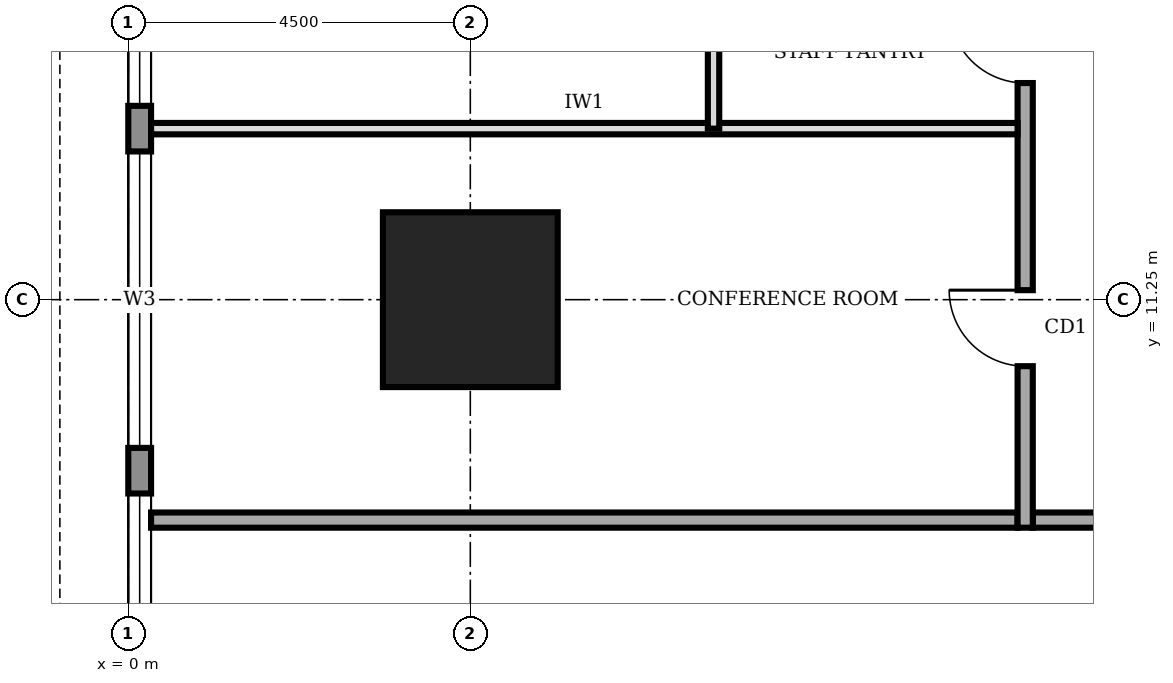
"""IFC4 building model, lengths in metres.
Left out: names, types, materials, properties, quantities, classifications, styles, units other than length and angle.
Written with IfcOpenShell. Run it as: python <this file> out.ifc"""

import sys

from ifc_helpers import new_model, si_unit, direction, frame, frame_2d, origin, origin_2d, place, context, subcontext, project, spatial, rectangle, extrude, element, fill, save


model = new_model("IFC4")
c1 = context("Model", 3, precision=1e-05, world=origin(), true_north=direction((0.0, 1.0)))
c2 = subcontext(c1, "Body", "Model", "MODEL_VIEW")
j1 = project(units=[si_unit("LENGTHUNIT", "METRE"), si_unit("PLANEANGLEUNIT", "RADIAN")], contexts=[c1])
p1 = place(None, origin())
s1 = spatial("IfcSite", under=j1, at=p1, CompositionType="ELEMENT")
p2 = place(p1, origin())
s2 = spatial("IfcBuilding", under=s1, at=p2, CompositionType="ELEMENT")
p3 = place(p2, frame((0.0, 0.0, 97.0)))
s3 = spatial("IfcBuildingStorey", under=s2, at=p3, CompositionType="ELEMENT", Elevation=97.0)
p4 = place(p3, frame((4.5, 11.25, 0.0), z_axis=(0.0, 0.0, 1.0), x_axis=(1.0, 0.0, 0.0)))
e1 = element("IfcColumn", 1, at=p4, inside=s3, PredefinedType="COLUMN", context=c2, shape_type="SweptSolid", body=[
    extrude(rectangle(XDim=2.3, YDim=2.3, at=origin_2d()), origin(), (0.0, 0.0, 1.0), 4.0),
])
p5 = place(p3, frame((0.15, 35.98, 0.0), z_axis=(0.0, 0.0, 1.0), x_axis=(0.0, -1.0, 0.0)))
e2 = element("IfcWall", 2, at=p5, inside=s3, PredefinedType="STANDARD", context=c2, shape_type="SweptSolid", body=[
    extrude(rectangle(XDim=31.46, YDim=0.3, at=frame_2d((15.73, 0.0))), origin(), (0.0, 0.0, 1.0), 3.75),
])
p6 = place(p5, frame((27.28, 0.0, 0.95)))
e3 = element("IfcOpeningElement", 3, at=p6, cuts=e2, PredefinedType="OPENING", context=c2, shape_type="SweptSolid", body=[
    extrude(rectangle(XDim=3.9, YDim=1.8, at=frame_2d((1.95, 0.9))), frame((0.0, 0.16, 0.0), z_axis=(0.0, -1.0, 0.0), x_axis=(1.0, 0.0, 0.0)), (0.0, 0.0, 1.0), 0.32),
])
p7 = place(p5, frame((22.78, 0.0, 0.95)))
e4 = element("IfcOpeningElement", 4, at=p7, cuts=e2, PredefinedType="OPENING", context=c2, shape_type="SweptSolid", body=[
    extrude(rectangle(XDim=3.9, YDim=1.8, at=frame_2d((1.95, 0.9))), frame((0.0, 0.16, 0.0), z_axis=(0.0, -1.0, 0.0), x_axis=(1.0, 0.0, 0.0)), (0.0, 0.0, 1.0), 0.32),
])
p8 = place(p5, frame((18.28, 0.0, 0.95)))
e5 = element("IfcOpeningElement", 5, at=p8, cuts=e2, PredefinedType="OPENING", context=c2, shape_type="SweptSolid", body=[
    extrude(rectangle(XDim=3.9, YDim=1.8, at=frame_2d((1.95, 0.9))), frame((0.0, 0.16, 0.0), z_axis=(0.0, -1.0, 0.0), x_axis=(1.0, 0.0, 0.0)), (0.0, 0.0, 1.0), 0.32),
])
p9 = place(p5, frame((13.78, 0.0, 0.95)))
e6 = element("IfcOpeningElement", 6, at=p9, cuts=e2, PredefinedType="OPENING", context=c2, shape_type="SweptSolid", body=[
    extrude(rectangle(XDim=3.9, YDim=1.8, at=frame_2d((1.95, 0.9))), frame((0.0, 0.16, 0.0), z_axis=(0.0, -1.0, 0.0), x_axis=(1.0, 0.0, 0.0)), (0.0, 0.0, 1.0), 0.32),
])
p10 = place(p5, frame((9.28, 0.0, 0.95)))
e7 = element("IfcOpeningElement", 7, at=p10, cuts=e2, PredefinedType="OPENING", context=c2, shape_type="SweptSolid", body=[
    extrude(rectangle(XDim=3.9, YDim=1.8, at=frame_2d((1.95, 0.9))), frame((0.0, 0.16, 0.0), z_axis=(0.0, -1.0, 0.0), x_axis=(1.0, 0.0, 0.0)), (0.0, 0.0, 1.0), 0.32),
])
p11 = place(p5, frame((4.78, 0.0, 0.95)))
e8 = element("IfcOpeningElement", 8, at=p11, cuts=e2, PredefinedType="OPENING", context=c2, shape_type="SweptSolid", body=[
    extrude(rectangle(XDim=3.9, YDim=1.8, at=frame_2d((1.95, 0.9))), frame((0.0, 0.16, 0.0), z_axis=(0.0, -1.0, 0.0), x_axis=(1.0, 0.0, 0.0)), (0.0, 0.0, 1.0), 0.32),
])
p12 = place(p3, frame((11.9, 8.35, 0.0), z_axis=(0.0, 0.0, 1.0), x_axis=(1.0, 0.0, 0.0)))
e9 = element("IfcWall", 9, at=p12, inside=s3, PredefinedType="SOLIDWALL", context=c2, shape_type="SweptSolid", body=[
    extrude(rectangle(XDim=28.3, YDim=0.2, at=frame_2d((14.15, 0.0))), origin(), (0.0, 0.0, 1.0), 3.75),
])
p13 = place(p12, frame((2.25, 0.0, 0.0)))
e10 = element("IfcOpeningElement", 10, at=p13, cuts=e9, PredefinedType="OPENING", context=c2, shape_type="SweptSolid", body=[
    extrude(rectangle(XDim=1.4, YDim=2.1, at=frame_2d((0.7, 1.05))), frame((0.0, 0.11, 0.0), z_axis=(0.0, -1.0, 0.0), x_axis=(1.0, 0.0, 0.0)), (0.0, 0.0, 1.0), 0.22),
])
p14 = place(p12, frame((7.85, 0.0, 0.0)))
e11 = element("IfcOpeningElement", 11, at=p14, cuts=e9, PredefinedType="OPENING", context=c2, shape_type="SweptSolid", body=[
    extrude(rectangle(XDim=1.0, YDim=2.1, at=frame_2d((0.5, 1.05))), frame((0.0, 0.11, 0.0), z_axis=(0.0, -1.0, 0.0), x_axis=(1.0, 0.0, 0.0)), (0.0, 0.0, 1.0), 0.22),
])
p15 = place(p12, frame((18.85, 0.0, 0.0)))
e12 = element("IfcOpeningElement", 12, at=p15, cuts=e9, PredefinedType="OPENING", context=c2, shape_type="SweptSolid", body=[
    extrude(rectangle(XDim=1.4, YDim=2.1, at=frame_2d((0.7, 1.05))), frame((0.0, 0.11, 0.0), z_axis=(0.0, -1.0, 0.0), x_axis=(1.0, 0.0, 0.0)), (0.0, 0.0, 1.0), 0.22),
])
p16 = place(p3, frame((11.8, 32.05, 0.0), z_axis=(0.0, 0.0, 1.0), x_axis=(0.0, -1.0, 0.0)))
e13 = element("IfcWall", 13, at=p16, inside=s3, PredefinedType="SOLIDWALL", context=c2, shape_type="SweptSolid", body=[
    extrude(rectangle(XDim=23.8, YDim=0.2, at=frame_2d((11.9, 0.0))), origin(), (0.0, 0.0, 1.0), 3.75),
])
p17 = place(p16, frame((20.675, 0.0, 0.0)))
e14 = element("IfcOpeningElement", 14, at=p17, cuts=e13, PredefinedType="OPENING", context=c2, shape_type="SweptSolid", body=[
    extrude(rectangle(XDim=1.0, YDim=2.1, at=frame_2d((0.5, 1.05))), frame((0.0, 0.11, 0.0), z_axis=(0.0, -1.0, 0.0), x_axis=(1.0, 0.0, 0.0)), (0.0, 0.0, 1.0), 0.22),
])
p18 = place(p16, frame((16.95, 0.0, 0.0)))
e15 = element("IfcOpeningElement", 15, at=p18, cuts=e13, PredefinedType="OPENING", context=c2, shape_type="SweptSolid", body=[
    extrude(rectangle(XDim=1.0, YDim=2.1, at=frame_2d((0.5, 1.05))), frame((0.0, 0.11, 0.0), z_axis=(0.0, -1.0, 0.0), x_axis=(1.0, 0.0, 0.0)), (0.0, 0.0, 1.0), 0.22),
])
p19 = place(p16, frame((13.95, 0.0, 0.0)))
e16 = element("IfcOpeningElement", 16, at=p19, cuts=e13, PredefinedType="OPENING", context=c2, shape_type="SweptSolid", body=[
    extrude(rectangle(XDim=0.9, YDim=2.1, at=frame_2d((0.45, 1.05))), frame((0.0, 0.11, 0.0), z_axis=(0.0, -1.0, 0.0), x_axis=(1.0, 0.0, 0.0)), (0.0, 0.0, 1.0), 0.22),
])
p20 = place(p16, frame((10.9, 0.0, 0.0)))
e17 = element("IfcOpeningElement", 17, at=p20, cuts=e13, PredefinedType="OPENING", context=c2, shape_type="SweptSolid", body=[
    extrude(rectangle(XDim=0.9, YDim=2.1, at=frame_2d((0.45, 1.05))), frame((0.0, 0.11, 0.0), z_axis=(0.0, -1.0, 0.0), x_axis=(1.0, 0.0, 0.0)), (0.0, 0.0, 1.0), 0.22),
])
p21 = place(p16, frame((6.2, 0.0, 0.0)))
e18 = element("IfcOpeningElement", 18, at=p21, cuts=e13, PredefinedType="OPENING", context=c2, shape_type="SweptSolid", body=[
    extrude(rectangle(XDim=0.9, YDim=2.1, at=frame_2d((0.45, 1.05))), frame((0.0, 0.11, 0.0), z_axis=(0.0, -1.0, 0.0), x_axis=(1.0, 0.0, 0.0)), (0.0, 0.0, 1.0), 0.22),
])
p22 = place(p16, frame((8.75, 0.0, 0.0)))
e19 = element("IfcOpeningElement", 19, at=p22, cuts=e13, PredefinedType="OPENING", context=c2, shape_type="SweptSolid", body=[
    extrude(rectangle(XDim=1.0, YDim=2.1, at=frame_2d((0.5, 1.05))), frame((0.0, 0.11, 0.0), z_axis=(0.0, -1.0, 0.0), x_axis=(1.0, 0.0, 0.0)), (0.0, 0.0, 1.0), 0.22),
])
p23 = place(p16, frame((1.925, 0.0, 0.0)))
e20 = element("IfcOpeningElement", 20, at=p23, cuts=e13, PredefinedType="OPENING", context=c2, shape_type="SweptSolid", body=[
    extrude(rectangle(XDim=1.0, YDim=2.1, at=frame_2d((0.5, 1.05))), frame((0.0, 0.11, 0.0), z_axis=(0.0, -1.0, 0.0), x_axis=(1.0, 0.0, 0.0)), (0.0, 0.0, 1.0), 0.22),
])
p24 = place(p3, frame((0.3, 8.35, 0.0), z_axis=(0.0, 0.0, 1.0), x_axis=(1.0, 0.0, 0.0)))
e21 = element("IfcWall", 21, at=p24, inside=s3, PredefinedType="SOLIDWALL", context=c2, shape_type="SweptSolid", body=[
    extrude(rectangle(XDim=11.4, YDim=0.2, at=frame_2d((5.7, 0.0))), origin(), (0.0, 0.0, 1.0), 3.75),
])
p25 = place(p3, frame((0.3, 13.5, 0.0), z_axis=(0.0, 0.0, 1.0), x_axis=(1.0, 0.0, 0.0)))
e22 = element("IfcWall", 22, at=p25, inside=s3, PredefinedType="PARTITIONING", context=c2, shape_type="SweptSolid", body=[
    extrude(rectangle(XDim=11.4, YDim=0.15, at=frame_2d((5.7, 0.0))), origin(), (0.0, 0.0, 1.0), 3.75),
])
p26 = place(p3, frame((7.7, 13.5, 0.0), z_axis=(0.0, 0.0, 1.0), x_axis=(0.0, 1.0, 0.0)))
e23 = element("IfcWall", 23, at=p26, inside=s3, PredefinedType="PARTITIONING", context=c2, shape_type="SweptSolid", body=[
    extrude(rectangle(XDim=2.2, YDim=0.15, at=frame_2d((1.1, 0.0))), origin(), (0.0, 0.0, 1.0), 3.75),
])
p27 = place(p6, origin())
e24 = element("IfcWindow", 24, at=p27, inside=s3, PartitioningType="SINGLE_PANEL", PredefinedType="WINDOW", context=c2, shape_type="SweptSolid", body=[
    extrude(rectangle(XDim=3.9, YDim=1.8, at=frame_2d((1.95, 0.9))), frame((0.0, 0.03, 0.0), z_axis=(0.0, -1.0, 0.0), x_axis=(1.0, 0.0, 0.0)), (0.0, 0.0, 1.0), 0.06),
])
fill(e3, e24)
p28 = place(p7, origin())
e25 = element("IfcWindow", 25, at=p28, inside=s3, PartitioningType="SINGLE_PANEL", PredefinedType="WINDOW", context=c2, shape_type="SweptSolid", body=[
    extrude(rectangle(XDim=3.9, YDim=1.8, at=frame_2d((1.95, 0.9))), frame((0.0, 0.03, 0.0), z_axis=(0.0, -1.0, 0.0), x_axis=(1.0, 0.0, 0.0)), (0.0, 0.0, 1.0), 0.06),
])
fill(e4, e25)
p29 = place(p8, origin())
e26 = element("IfcWindow", 26, at=p29, inside=s3, PartitioningType="SINGLE_PANEL", PredefinedType="WINDOW", context=c2, shape_type="SweptSolid", body=[
    extrude(rectangle(XDim=3.9, YDim=1.8, at=frame_2d((1.95, 0.9))), frame((0.0, 0.03, 0.0), z_axis=(0.0, -1.0, 0.0), x_axis=(1.0, 0.0, 0.0)), (0.0, 0.0, 1.0), 0.06),
])
fill(e5, e26)
p30 = place(p17, frame((1.0, 0.0, 0.0), z_axis=(0.0, 0.0, 1.0), x_axis=(-1.0, 0.0, 0.0)))
e27 = element("IfcDoor", 27, at=p30, inside=s3, OperationType="SINGLE_SWING_RIGHT", PredefinedType="DOOR", context=c2, shape_type="SweptSolid", body=[
    extrude(rectangle(XDim=1.0, YDim=2.1, at=frame_2d((0.5, 1.05))), frame((0.0, 0.025, 0.0), z_axis=(0.0, -1.0, 0.0), x_axis=(1.0, 0.0, 0.0)), (0.0, 0.0, 1.0), 0.05),
])
fill(e14, e27)
p31 = place(p18, frame((1.0, 0.0, 0.0), z_axis=(0.0, 0.0, 1.0), x_axis=(-1.0, 0.0, 0.0)))
e28 = element("IfcDoor", 28, at=p31, inside=s3, OperationType="SINGLE_SWING_RIGHT", PredefinedType="DOOR", context=c2, shape_type="SweptSolid", body=[
    extrude(rectangle(XDim=1.0, YDim=2.1, at=frame_2d((0.5, 1.05))), frame((0.0, 0.025, 0.0), z_axis=(0.0, -1.0, 0.0), x_axis=(1.0, 0.0, 0.0)), (0.0, 0.0, 1.0), 0.05),
])
fill(e15, e28)
save(model, sys.argv[1])
